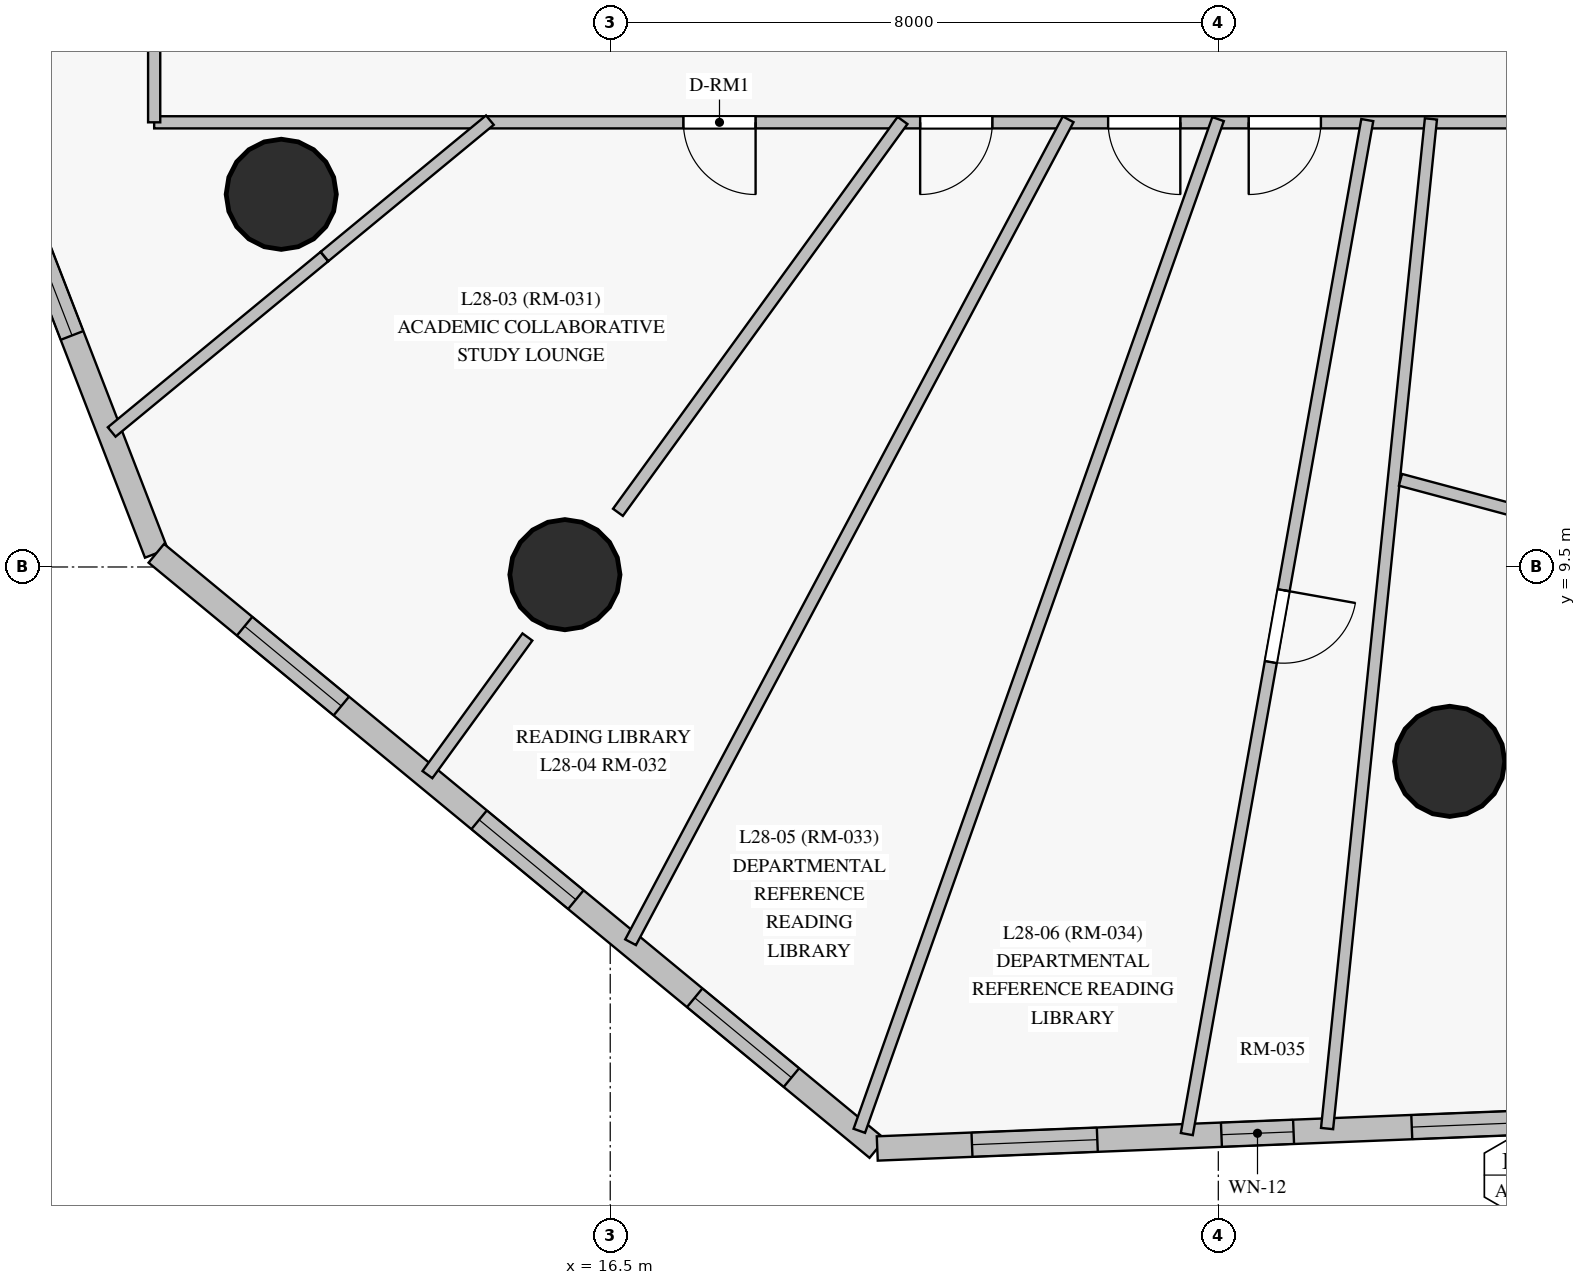
"""IFC4 building model, lengths in metres.
Left out: names, types, materials, properties, quantities, classifications, styles, units other than length and angle.
Written with IfcOpenShell. Run it as: python <this file> out.ifc"""

import sys

from ifc_helpers import new_model, si_unit, direction, frame, frame_2d, origin, origin_with_axes, origin_2d, place, context, subcontext, project, spatial, rectangle, circle, extrude, source, transform, mapped, element, fill, save


model = new_model("IFC4")
c1 = context("Model", 3, precision=1e-05, world=origin(), true_north=direction((0.0, 1.0)))
c2 = subcontext(c1, "Body", "Model", "MODEL_VIEW")
j1 = project(units=[si_unit("LENGTHUNIT", "METRE"), si_unit("PLANEANGLEUNIT", "RADIAN")], contexts=[c1])
p1 = place(None, origin())
s1 = spatial("IfcSite", under=j1, at=p1, CompositionType="ELEMENT")
p2 = place(p1, origin())
s2 = spatial("IfcBuilding", under=s1, at=p2, CompositionType="ELEMENT")
p3 = place(p2, frame((0.0, 0.0, 105.35)))
s3 = spatial("IfcBuildingStorey", under=s2, at=p3, CompositionType="ELEMENT", Elevation=105.35)
m1 = source(origin_with_axes(), c2, "Body", "SweptSolid", [
    extrude(circle(Radius=0.725, at=origin_2d()), origin(), (0.0, 0.0, 1.0), 3.05),
])
for number, where, z_axis, x_axis in (
    (1, (12.172, 14.403, 0.0), (0.0, 0.0, 1.0), (1.0, 0.0, 0.0)),
    (2, (15.904, 9.399, 0.0), (0.0, 0.0, 1.0), (1.0, 0.0, 0.0)),
    (3, (27.544, 6.943, 0.0), (0.0, 0.0, 1.0), (1.0, 0.0, 0.0)),
):
    element("IfcColumn", number, at=place(p3, frame(where, z_axis=z_axis, x_axis=x_axis)), inside=s3, PredefinedType="COLUMN", context=c2, shape_type="MappedRepresentation", body=[
        mapped(m1, transform((0.0, 0.0, 0.0), scale=1.0)),
    ])
p4 = place(p3, frame((6.964, 18.893, 0.0), z_axis=(0.0, 0.0, 1.0), x_axis=(0.36084155701, -0.932627133819, 0.0)))
e4 = element("IfcWall", 4, at=p4, inside=s3, PredefinedType="SOLIDWALL", context=c2, shape_type="SweptSolid", body=[
    extrude(rectangle(XDim=9.878, YDim=0.32, at=frame_2d((4.939, 0.0))), origin(), (0.0, 0.0, 1.0), 2.825),
])
p5 = place(p4, frame((1.422, 0.0, 0.85)))
e5 = element("IfcOpeningElement", 5, at=p5, cuts=e4, PredefinedType="OPENING", context=c2, shape_type="SweptSolid", body=[
    extrude(rectangle(XDim=1.65, YDim=1.65, at=frame_2d((0.825, 0.825))), frame((0.0, 0.17, 0.0), z_axis=(0.0, -1.0, 0.0), x_axis=(1.0, 0.0, 0.0)), (0.0, 0.0, 1.0), 0.34),
])
p6 = place(p4, frame((5.155, 0.0, 0.85)))
e6 = element("IfcOpeningElement", 6, at=p6, cuts=e4, PredefinedType="OPENING", context=c2, shape_type="SweptSolid", body=[
    extrude(rectangle(XDim=1.65, YDim=1.65, at=frame_2d((0.825, 0.825))), frame((0.0, 0.17, 0.0), z_axis=(0.0, -1.0, 0.0), x_axis=(1.0, 0.0, 0.0)), (0.0, 0.0, 1.0), 0.34),
])
p7 = place(p3, frame((10.528, 9.68, 0.0), z_axis=(0.0, 0.0, 1.0), x_axis=(0.771180794378, -0.636616197078, 0.0)))
e7 = element("IfcWall", 7, at=p7, inside=s3, PredefinedType="SOLIDWALL", context=c2, shape_type="SweptSolid", body=[
    extrude(rectangle(XDim=12.299, YDim=0.32, at=frame_2d((6.149, 0.0))), origin(), (0.0, 0.0, 1.0), 2.825),
])
p8 = place(p7, frame((1.506, 0.0, 0.85)))
e8 = element("IfcOpeningElement", 8, at=p8, cuts=e7, PredefinedType="OPENING", context=c2, shape_type="SweptSolid", body=[
    extrude(rectangle(XDim=1.65, YDim=1.65, at=frame_2d((0.825, 0.825))), frame((0.0, 0.17, 0.0), z_axis=(0.0, -1.0, 0.0), x_axis=(1.0, 0.0, 0.0)), (0.0, 0.0, 1.0), 0.34),
])
p9 = place(p7, frame((5.507, 0.0, 0.85)))
e9 = element("IfcOpeningElement", 9, at=p9, cuts=e7, PredefinedType="OPENING", context=c2, shape_type="SweptSolid", body=[
    extrude(rectangle(XDim=1.65, YDim=1.65, at=frame_2d((0.825, 0.825))), frame((0.0, 0.17, 0.0), z_axis=(0.0, -1.0, 0.0), x_axis=(1.0, 0.0, 0.0)), (0.0, 0.0, 1.0), 0.34),
])
p10 = place(p7, frame((9.185, 0.0, 0.85)))
e10 = element("IfcOpeningElement", 10, at=p10, cuts=e7, PredefinedType="OPENING", context=c2, shape_type="SweptSolid", body=[
    extrude(rectangle(XDim=1.65, YDim=1.65, at=frame_2d((0.825, 0.825))), frame((0.0, 0.17, 0.0), z_axis=(0.0, -1.0, 0.0), x_axis=(1.0, 0.0, 0.0)), (0.0, 0.0, 1.0), 0.34),
])
p11 = place(p3, frame((20.013, 1.85, 0.0), z_axis=(0.0, 0.0, 1.0), x_axis=(0.999202619629, 0.039926494047, 0.0)))
e11 = element("IfcWall", 11, at=p11, inside=s3, PredefinedType="SOLIDWALL", context=c2, shape_type="SweptSolid", body=[
    extrude(rectangle(XDim=9.857, YDim=0.32, at=frame_2d((4.928, 0.0))), origin(), (0.0, 0.0, 1.0), 2.825),
])
p12 = place(p11, frame((1.247, 0.0, 0.85)))
e12 = element("IfcOpeningElement", 12, at=p12, cuts=e11, PredefinedType="OPENING", context=c2, shape_type="SweptSolid", body=[
    extrude(rectangle(XDim=1.65, YDim=1.65, at=frame_2d((0.825, 0.825))), frame((0.0, 0.17, 0.0), z_axis=(0.0, -1.0, 0.0), x_axis=(1.0, 0.0, 0.0)), (0.0, 0.0, 1.0), 0.34),
])
p13 = place(p11, frame((4.531, 0.0, 0.85)))
e13 = element("IfcOpeningElement", 13, at=p13, cuts=e11, PredefinedType="OPENING", context=c2, shape_type="SweptSolid", body=[
    extrude(rectangle(XDim=0.95, YDim=1.5, at=frame_2d((0.475, 0.75))), frame((0.0, 0.17, 0.0), z_axis=(0.0, -1.0, 0.0), x_axis=(1.0, 0.0, 0.0)), (0.0, 0.0, 1.0), 0.34),
])
p14 = place(p11, frame((7.038, 0.0, 0.85)))
e14 = element("IfcOpeningElement", 14, at=p14, cuts=e11, PredefinedType="OPENING", context=c2, shape_type="SweptSolid", body=[
    extrude(rectangle(XDim=1.65, YDim=1.65, at=frame_2d((0.825, 0.825))), frame((0.0, 0.17, 0.0), z_axis=(0.0, -1.0, 0.0), x_axis=(1.0, 0.0, 0.0)), (0.0, 0.0, 1.0), 0.34),
])
p15 = place(p3, frame((40.25, 15.35, 0.0), z_axis=(0.0, 0.0, 1.0), x_axis=(-1.0, 0.0, 0.0)))
e15 = element("IfcWall", 15, at=p15, inside=s3, PredefinedType="PARTITIONING", context=c2, shape_type="SweptSolid", body=[
    extrude(rectangle(XDim=29.75, YDim=0.16, at=frame_2d((14.875, 0.0))), origin(), (0.0, 0.0, 1.0), 2.225),
])
p16 = place(p15, frame((21.837, 0.0, 0.0)))
e16 = element("IfcOpeningElement", 16, at=p16, cuts=e15, PredefinedType="OPENING", context=c2, shape_type="SweptSolid", body=[
    extrude(rectangle(XDim=0.95, YDim=2.15, at=frame_2d((0.475, 1.075))), frame((0.0, 0.09, 0.0), z_axis=(0.0, -1.0, 0.0), x_axis=(1.0, 0.0, 0.0)), (0.0, 0.0, 1.0), 0.18),
])
p17 = place(p15, frame((18.722, 0.0, 0.0)))
e17 = element("IfcOpeningElement", 17, at=p17, cuts=e15, PredefinedType="OPENING", context=c2, shape_type="SweptSolid", body=[
    extrude(rectangle(XDim=0.95, YDim=2.15, at=frame_2d((0.475, 1.075))), frame((0.0, 0.09, 0.0), z_axis=(0.0, -1.0, 0.0), x_axis=(1.0, 0.0, 0.0)), (0.0, 0.0, 1.0), 0.18),
])
p18 = place(p15, frame((16.25, 0.0, 0.0)))
e18 = element("IfcOpeningElement", 18, at=p18, cuts=e15, PredefinedType="OPENING", context=c2, shape_type="SweptSolid", body=[
    extrude(rectangle(XDim=0.95, YDim=2.15, at=frame_2d((0.475, 1.075))), frame((0.0, 0.09, 0.0), z_axis=(0.0, -1.0, 0.0), x_axis=(1.0, 0.0, 0.0)), (0.0, 0.0, 1.0), 0.18),
])
p19 = place(p15, frame((14.4, 0.0, 0.0)))
e19 = element("IfcOpeningElement", 19, at=p19, cuts=e15, PredefinedType="OPENING", context=c2, shape_type="SweptSolid", body=[
    extrude(rectangle(XDim=0.95, YDim=2.15, at=frame_2d((0.475, 1.075))), frame((0.0, 0.09, 0.0), z_axis=(0.0, -1.0, 0.0), x_axis=(1.0, 0.0, 0.0)), (0.0, 0.0, 1.0), 0.18),
])
p20 = place(p15, frame((9.938, 0.0, 0.0)))
e20 = element("IfcOpeningElement", 20, at=p20, cuts=e15, PredefinedType="OPENING", context=c2, shape_type="SweptSolid", body=[
    extrude(rectangle(XDim=0.95, YDim=2.15, at=frame_2d((0.475, 1.075))), frame((0.0, 0.09, 0.0), z_axis=(0.0, -1.0, 0.0), x_axis=(1.0, 0.0, 0.0)), (0.0, 0.0, 1.0), 0.18),
])
p21 = place(p3, frame((10.5, 15.35, 0.0), z_axis=(0.0, 0.0, 1.0), x_axis=(0.0, 1.0, 0.0)))
e21 = element("IfcWall", 21, at=p21, inside=s3, PredefinedType="PARTITIONING", context=c2, shape_type="SweptSolid", body=[
    extrude(rectangle(XDim=21.502, YDim=0.16, at=frame_2d((10.751, 0.0))), origin(), (0.0, 0.0, 1.0), 2.825),
])
p22 = place(p21, frame((9.556, 0.0, 0.0)))
e22 = element("IfcOpeningElement", 22, at=p22, cuts=e21, PredefinedType="OPENING", context=c2, shape_type="SweptSolid", body=[
    extrude(rectangle(XDim=0.96, YDim=2.15, at=frame_2d((0.48, 1.075))), frame((0.0, 0.09, 0.0), z_axis=(0.0, -1.0, 0.0), x_axis=(1.0, 0.0, 0.0)), (0.0, 0.0, 1.0), 0.18),
])
p23 = place(p21, frame((13.397, 0.0, 0.0)))
e23 = element("IfcOpeningElement", 23, at=p23, cuts=e21, PredefinedType="OPENING", context=c2, shape_type="SweptSolid", body=[
    extrude(rectangle(XDim=0.95, YDim=2.15, at=frame_2d((0.475, 1.075))), frame((0.0, 0.09, 0.0), z_axis=(0.0, -1.0, 0.0), x_axis=(1.0, 0.0, 0.0)), (0.0, 0.0, 1.0), 0.18),
])
p24 = place(p3, frame((24.497, 15.392, 0.0), z_axis=(0.0, 0.0, 1.0), x_axis=(-0.334244901662, -0.942486257572, 0.0)))
e24 = element("IfcWall", 24, at=p24, inside=s3, PredefinedType="PARTITIONING", context=c2, shape_type="SweptSolid", body=[
    extrude(rectangle(XDim=14.122, YDim=0.16, at=frame_2d((7.061, 0.0))), origin(), (0.0, 0.0, 1.0), 2.825),
])
p25 = place(p3, frame((26.46, 15.379, 0.0), z_axis=(0.0, 0.0, 1.0), x_axis=(-0.175226234802, -0.984528194943, 0.0)))
e25 = element("IfcWall", 25, at=p25, inside=s3, PredefinedType="PARTITIONING", context=c2, shape_type="SweptSolid", body=[
    extrude(rectangle(XDim=13.55, YDim=0.16, at=frame_2d((6.775, 0.0))), origin(), (0.0, 0.0, 1.0), 2.225),
])
p26 = place(p25, frame((6.282, 0.0, 0.0)))
e26 = element("IfcOpeningElement", 26, at=p26, cuts=e25, PredefinedType="OPENING", context=c2, shape_type="SweptSolid", body=[
    extrude(rectangle(XDim=0.96, YDim=2.15, at=frame_2d((0.48, 1.075))), frame((0.0, 0.09, 0.0), z_axis=(0.0, -1.0, 0.0), x_axis=(1.0, 0.0, 0.0)), (0.0, 0.0, 1.0), 0.18),
])
p27 = place(p3, frame((27.297, 15.395, 0.0), z_axis=(0.0, 0.0, 1.0), x_axis=(-0.102334594385, -0.994750034326, 0.0)))
e27 = element("IfcWall", 27, at=p27, inside=s3, PredefinedType="PARTITIONING", context=c2, shape_type="SweptSolid", body=[
    extrude(rectangle(XDim=13.353, YDim=0.16, at=frame_2d((6.676, 0.0))), origin(), (0.0, 0.0, 1.0), 2.225),
])
p28 = place(p3, frame((22.525, 15.39, 0.0), z_axis=(0.0, 0.0, 1.0), x_axis=(-0.469484190542, -0.882940878446, 0.0)))
e28 = element("IfcWall", 28, at=p28, inside=s3, PredefinedType="PARTITIONING", context=c2, shape_type="SweptSolid", body=[
    extrude(rectangle(XDim=12.262, YDim=0.16, at=frame_2d((6.131, 0.0))), origin(), (0.0, 0.0, 1.0), 2.825),
])
p29 = place(p3, frame((20.346, 15.374, 0.0), z_axis=(0.0, 0.0, 1.0), x_axis=(-0.587642992442, -0.809120333099, 0.0)))
e29 = element("IfcWall", 29, at=p29, inside=s3, PredefinedType="PARTITIONING", context=c2, shape_type="SweptSolid", body=[
    extrude(rectangle(XDim=6.371, YDim=0.16, at=frame_2d((3.186, 0.0))), origin(), (0.0, 0.0, 1.0), 2.225),
])
p30 = place(p3, frame((12.739, 13.583, 0.0), z_axis=(0.0, 0.0, 1.0), x_axis=(-0.77155501954, -0.636162598572, 0.0)))
e30 = element("IfcWall", 30, at=p30, inside=s3, PredefinedType="PARTITIONING", context=c2, shape_type="SweptSolid", body=[
    extrude(rectangle(XDim=3.626, YDim=0.16, at=frame_2d((1.813, 0.0))), origin(), (0.0, 0.0, 1.0), 2.825),
])
p31 = place(p3, frame((14.917, 15.379, 0.0), z_axis=(0.0, 0.0, 1.0), x_axis=(-0.771567698741, -0.636147220587, 0.0)))
e31 = element("IfcWall", 31, at=p31, inside=s3, PredefinedType="PARTITIONING", context=c2, shape_type="SweptSolid", body=[
    extrude(rectangle(XDim=2.82, YDim=0.16, at=frame_2d((1.41, 0.0))), origin(), (0.0, 0.0, 1.0), 2.225),
])
p32 = place(p3, frame((15.41, 8.579, 0.0), z_axis=(0.0, 0.0, 1.0), x_axis=(-0.587607293025, -0.809146259451, 0.0)))
e32 = element("IfcWall", 32, at=p32, inside=s3, PredefinedType="PARTITIONING", context=c2, shape_type="SweptSolid", body=[
    extrude(rectangle(XDim=2.238, YDim=0.16, at=frame_2d((1.119, 0.0))), origin(), (0.0, 0.0, 1.0), 2.825),
])
p33 = place(p3, frame((26.896, 10.647, 0.0), z_axis=(0.0, 0.0, 1.0), x_axis=(0.96593164329, -0.258797334783, 0.0)))
e33 = element("IfcWall", 33, at=p33, inside=s3, PredefinedType="PARTITIONING", context=c2, shape_type="SweptSolid", body=[
    extrude(rectangle(XDim=1.66, YDim=0.16, at=frame_2d((0.83, 0.0))), origin(), (0.0, 0.0, 1.0), 2.325),
])
m2 = source(origin_with_axes(), c2, "Body", "SweptSolid", [
    extrude(rectangle(XDim=1.65, YDim=1.65, at=frame_2d((0.825, 0.825))), frame((0.0, 0.03, 0.0), z_axis=(0.0, -1.0, 0.0), x_axis=(1.0, 0.0, 0.0)), (0.0, 0.0, 1.0), 0.06),
])
p34 = place(p6, origin())
e34 = element("IfcWindow", 34, at=p34, inside=s3, PartitioningType="SINGLE_PANEL", PredefinedType="WINDOW", context=c2, shape_type="MappedRepresentation", body=[
    mapped(m2, transform((0.0, 0.0, 0.0), scale=1.0)),
])
fill(e6, e34)
p35 = place(p8, origin())
e35 = element("IfcWindow", 35, at=p35, inside=s3, PartitioningType="SINGLE_PANEL", PredefinedType="WINDOW", context=c2, shape_type="MappedRepresentation", body=[
    mapped(m2, transform((0.0, 0.0, 0.0), scale=1.0)),
])
fill(e8, e35)
p36 = place(p9, origin())
e36 = element("IfcWindow", 36, at=p36, inside=s3, PartitioningType="SINGLE_PANEL", PredefinedType="WINDOW", context=c2, shape_type="MappedRepresentation", body=[
    mapped(m2, transform((0.0, 0.0, 0.0), scale=1.0)),
])
fill(e9, e36)
p37 = place(p10, origin())
e37 = element("IfcWindow", 37, at=p37, inside=s3, PartitioningType="SINGLE_PANEL", PredefinedType="WINDOW", context=c2, shape_type="MappedRepresentation", body=[
    mapped(m2, transform((0.0, 0.0, 0.0), scale=1.0)),
])
fill(e10, e37)
p38 = place(p12, origin())
e38 = element("IfcWindow", 38, at=p38, inside=s3, PartitioningType="SINGLE_PANEL", PredefinedType="WINDOW", context=c2, shape_type="MappedRepresentation", body=[
    mapped(m2, transform((0.0, 0.0, 0.0), scale=1.0)),
])
fill(e12, e38)
m3 = source(origin_with_axes(), c2, "Body", "SweptSolid", [
    extrude(rectangle(XDim=0.95, YDim=1.5, at=frame_2d((0.475, 0.75))), frame((0.0, 0.03, 0.0), z_axis=(0.0, -1.0, 0.0), x_axis=(1.0, 0.0, 0.0)), (0.0, 0.0, 1.0), 0.06),
])
p39 = place(p13, origin())
e39 = element("IfcWindow", 39, at=p39, inside=s3, PartitioningType="SINGLE_PANEL", PredefinedType="WINDOW", context=c2, shape_type="MappedRepresentation", body=[
    mapped(m3, transform((0.0, 0.0, 0.0), scale=1.0)),
])
fill(e13, e39)
p40 = place(p14, origin())
e40 = element("IfcWindow", 40, at=p40, inside=s3, PartitioningType="SINGLE_PANEL", PredefinedType="WINDOW", context=c2, shape_type="MappedRepresentation", body=[
    mapped(m2, transform((0.0, 0.0, 0.0), scale=1.0)),
])
fill(e14, e40)
m4 = source(origin_with_axes(), c2, "Body", "SweptSolid", [
    extrude(rectangle(XDim=0.95, YDim=2.15, at=frame_2d((0.475, 1.075))), frame((0.0, 0.025, 0.0), z_axis=(0.0, -1.0, 0.0), x_axis=(1.0, 0.0, 0.0)), (0.0, 0.0, 1.0), 0.05),
])
p41 = place(p16, origin())
e41 = element("IfcDoor", 41, at=p41, inside=s3, OperationType="SINGLE_SWING_LEFT", PredefinedType="DOOR", context=c2, shape_type="MappedRepresentation", body=[
    mapped(m4, transform((0.0, 0.0, 0.0), scale=1.0)),
])
fill(e16, e41)
p42 = place(p17, origin())
e42 = element("IfcDoor", 42, at=p42, inside=s3, OperationType="SINGLE_SWING_RIGHT", PredefinedType="DOOR", context=c2, shape_type="MappedRepresentation", body=[
    mapped(m4, transform((0.0, 0.0, 0.0), scale=1.0)),
])
fill(e17, e42)
p43 = place(p18, origin())
e43 = element("IfcDoor", 43, at=p43, inside=s3, OperationType="SINGLE_SWING_LEFT", PredefinedType="DOOR", context=c2, shape_type="MappedRepresentation", body=[
    mapped(m4, transform((0.0, 0.0, 0.0), scale=1.0)),
])
fill(e18, e43)
p44 = place(p19, origin())
e44 = element("IfcDoor", 44, at=p44, inside=s3, OperationType="SINGLE_SWING_RIGHT", PredefinedType="DOOR", context=c2, shape_type="MappedRepresentation", body=[
    mapped(m4, transform((0.0, 0.0, 0.0), scale=1.0)),
])
fill(e19, e44)
m5 = source(origin_with_axes(), c2, "Body", "SweptSolid", [
    extrude(rectangle(XDim=0.96, YDim=2.15, at=frame_2d((0.48, 1.075))), frame((0.0, 0.025, 0.0), z_axis=(0.0, -1.0, 0.0), x_axis=(1.0, 0.0, 0.0)), (0.0, 0.0, 1.0), 0.05),
])
p45 = place(p26, origin())
e45 = element("IfcDoor", 45, at=p45, inside=s3, OperationType="SINGLE_SWING_LEFT", PredefinedType="DOOR", context=c2, shape_type="MappedRepresentation", body=[
    mapped(m5, transform((0.0, 0.0, 0.0), scale=1.0)),
])
fill(e26, e45)
save(model, sys.argv[1])
